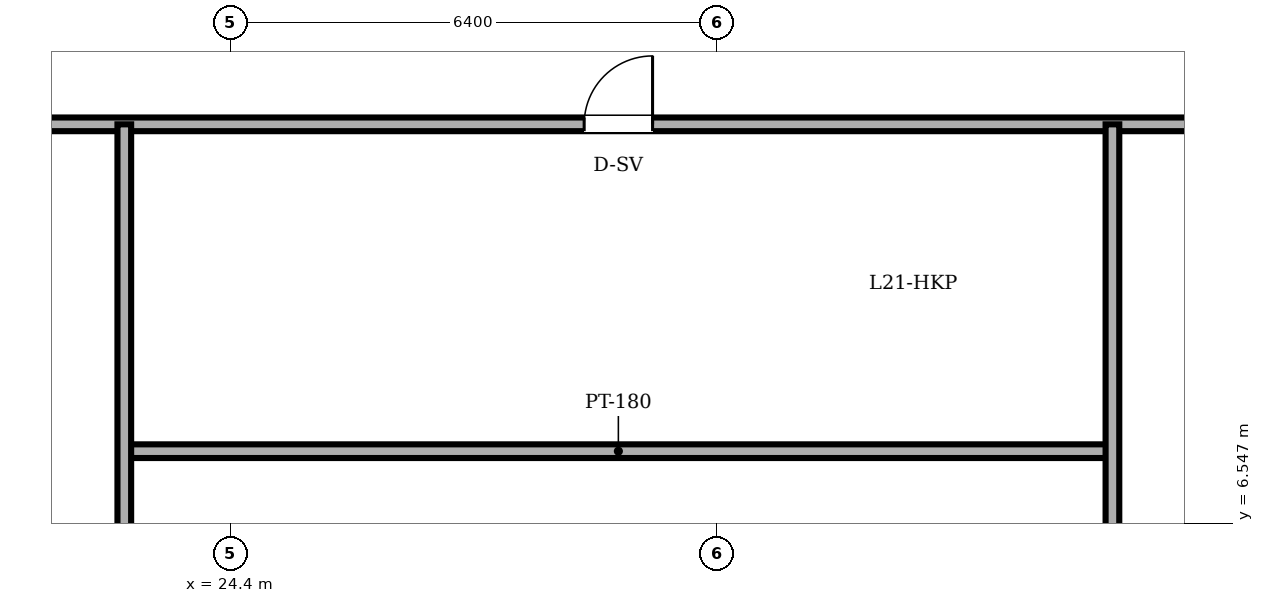
"""IFC4 building model, lengths in metres.
Left out: names, types, materials, properties, quantities, classifications, styles, units other than length and angle.
Written with IfcOpenShell. Run it as: python <this file> out.ifc"""

import sys

from ifc_helpers import new_model, si_unit, direction, frame, frame_2d, origin, place, context, subcontext, project, spatial, rectangle, extrude, element, fill, save


model = new_model("IFC4")
c1 = context("Model", 3, precision=1e-05, world=origin(), true_north=direction((0.0, 1.0)))
c2 = subcontext(c1, "Body", "Model", "MODEL_VIEW")
j1 = project(units=[si_unit("LENGTHUNIT", "METRE"), si_unit("PLANEANGLEUNIT", "RADIAN")], contexts=[c1])
p1 = place(None, origin())
s1 = spatial("IfcSite", under=j1, at=p1, CompositionType="ELEMENT")
p2 = place(p1, origin())
s2 = spatial("IfcBuilding", under=s1, at=p2, CompositionType="ELEMENT")
p3 = place(p2, frame((0.0, 0.0, 81.2)))
s3 = spatial("IfcBuildingStorey", under=s2, at=p3, CompositionType="ELEMENT", Elevation=81.2)
p4 = place(p3, frame((23.0, 7.5, 0.0), z_axis=(0.0, 0.0, 1.0), x_axis=(1.0, 0.0, 0.0)))
e1 = element("IfcWall", 1, at=p4, inside=s3, PredefinedType="PARTITIONING", context=c2, shape_type="SweptSolid", body=[
    extrude(rectangle(XDim=13.0, YDim=0.18, at=frame_2d((6.5, 0.0))), origin(), (0.0, 0.0, 1.0), 4.9),
])
p5 = place(p3, frame((8.8, 11.8, 0.0), z_axis=(0.0, 0.0, 1.0), x_axis=(1.0, 0.0, 0.0)))
e2 = element("IfcWall", 2, at=p5, inside=s3, PredefinedType="PARTITIONING", context=c2, shape_type="SweptSolid", body=[
    extrude(rectangle(XDim=31.1, YDim=0.18, at=frame_2d((15.55, 0.0))), origin(), (0.0, 0.0, 1.0), 4.9),
])
p6 = place(p5, frame((20.25, 0.0, 0.0)))
e3 = element("IfcOpeningElement", 3, at=p6, cuts=e2, PredefinedType="OPENING", context=c2, shape_type="SweptSolid", body=[
    extrude(rectangle(XDim=0.9, YDim=2.05, at=frame_2d((0.45, 1.025))), frame((0.0, 0.1, 0.0), z_axis=(0.0, -1.0, 0.0), x_axis=(1.0, 0.0, 0.0)), (0.0, 0.0, 1.0), 0.2),
])
for number, where, z_axis, x_axis in (
    (4, (23.0, 4.2, 0.0), (0.0, 0.0, 1.0), (0.0, 1.0, 0.0)),
    (5, (36.0, 4.2, 0.0), (0.0, 0.0, 1.0), (0.0, 1.0, 0.0)),
):
    element("IfcWall", number, at=place(p3, frame(where, z_axis=z_axis, x_axis=x_axis)), inside=s3, PredefinedType="PARTITIONING", context=c2, shape_type="SweptSolid", body=[
        extrude(rectangle(XDim=7.6, YDim=0.18, at=frame_2d((3.8, 0.0))), origin(), (0.0, 0.0, 1.0), 4.9),
    ])
p7 = place(p6, origin())
e6 = element("IfcDoor", 6, at=p7, inside=s3, OperationType="SINGLE_SWING_RIGHT", PredefinedType="DOOR", context=c2, shape_type="SweptSolid", body=[
    extrude(rectangle(XDim=0.9, YDim=2.05, at=frame_2d((0.45, 1.025))), frame((0.0, 0.025, 0.0), z_axis=(0.0, -1.0, 0.0), x_axis=(1.0, 0.0, 0.0)), (0.0, 0.0, 1.0), 0.05),
])
fill(e3, e6)
save(model, sys.argv[1])
